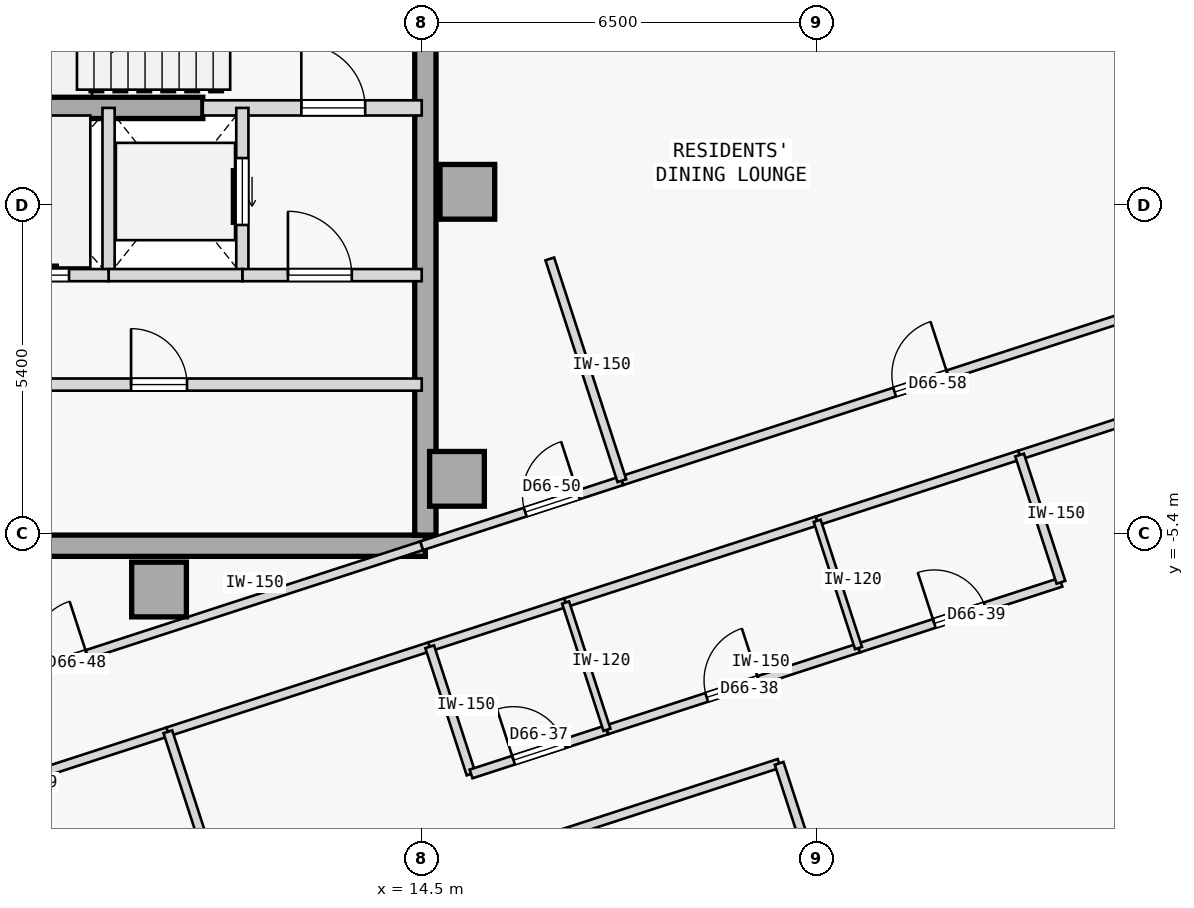
"""IFC4 building model, lengths in metres.
Left out: names, types, materials, properties, quantities, classifications, styles, units other than length and angle.
Written with IfcOpenShell. Run it as: python <this file> out.ifc"""

import sys

from ifc_helpers import new_model, si_unit, direction, frame, frame_2d, origin, origin_2d, place, context, subcontext, project, spatial, rectangle, extrude, element, fill, save


model = new_model("IFC4")
c1 = context("Model", 3, precision=1e-05, world=origin(), true_north=direction((0.0, 1.0)))
c2 = subcontext(c1, "Body", "Model", "MODEL_VIEW")
j1 = project(units=[si_unit("LENGTHUNIT", "METRE"), si_unit("PLANEANGLEUNIT", "RADIAN")], contexts=[c1])
p1 = place(None, origin())
s1 = spatial("IfcSite", under=j1, at=p1, CompositionType="ELEMENT")
p2 = place(p1, origin())
s2 = spatial("IfcBuilding", under=s1, at=p2, CompositionType="ELEMENT")
p3 = place(p2, frame((0.0, 0.0, 247.75)))
s3 = spatial("IfcBuildingStorey", under=s2, at=p3, CompositionType="ELEMENT", Elevation=247.75)
for number, where, z_axis, x_axis in (
    (1, (15.25, 0.22, 0.0), (0.0, 0.0, 1.0), (1.0, 0.0, 0.0)),
    (2, (15.08, -4.5, 0.0), (0.0, 0.0, 1.0), (1.0, 0.0, 0.0)),
    (3, (10.18, -6.32, 0.0), (0.0, 0.0, 1.0), (1.0, 0.0, 0.0)),
):
    element("IfcColumn", number, at=place(p3, frame(where, z_axis=z_axis, x_axis=x_axis)), inside=s3, PredefinedType="COLUMN", context=c2, shape_type="SweptSolid", body=[
        extrude(rectangle(XDim=0.9, YDim=0.9, at=origin_2d()), origin(), (0.0, 0.0, 1.0), 3.35),
    ])
p4 = place(p3, frame((3.7, -5.6, 0.0), z_axis=(0.0, 0.0, 1.0), x_axis=(1.0, 0.0, 0.0)))
e4 = element("IfcWall", 4, at=p4, inside=s3, PredefinedType="SHEAR", context=c2, shape_type="SweptSolid", body=[
    extrude(rectangle(XDim=10.86, YDim=0.35, at=frame_2d((5.43, 0.0))), origin(), (0.0, 0.0, 1.0), 3.125),
])
p5 = place(p3, frame((14.56, -5.425, 0.0), z_axis=(0.0, 0.0, 1.0), x_axis=(0.0, 1.0, 0.0)))
e5 = element("IfcWall", 5, at=p5, inside=s3, PredefinedType="SHEAR", context=c2, shape_type="SweptSolid", body=[
    extrude(rectangle(XDim=10.85, YDim=0.35, at=frame_2d((5.425, 0.0))), origin(), (0.0, 0.0, 1.0), 3.125),
])
p6 = place(p3, frame((5.75, 1.6, 0.0), z_axis=(0.0, 0.0, 1.0), x_axis=(1.0, 0.0, 0.0)))
e6 = element("IfcWall", 6, at=p6, inside=s3, PredefinedType="SHEAR", context=c2, shape_type="SweptSolid", body=[
    extrude(rectangle(XDim=5.15, YDim=0.35, at=frame_2d((2.575, 0.0))), origin(), (0.0, 0.0, 1.0), 3.125),
])
p7 = place(p3, frame((10.9, 1.6, 0.0), z_axis=(0.0, 0.0, 1.0), x_axis=(1.0, 0.0, 0.0)))
e7 = element("IfcWall", 7, at=p7, inside=s3, PredefinedType="STANDARD", context=c2, shape_type="SweptSolid", body=[
    extrude(rectangle(XDim=3.6, YDim=0.25, at=frame_2d((1.8, 0.0))), origin(), (0.0, 0.0, 1.0), 3.125),
])
p8 = place(p7, frame((1.62, 0.0, 0.0)))
e8 = element("IfcOpeningElement", 8, at=p8, cuts=e7, PredefinedType="OPENING", context=c2, shape_type="SweptSolid", body=[
    extrude(rectangle(XDim=1.05, YDim=2.15, at=frame_2d((0.525, 1.075))), frame((0.0, 0.135, 0.0), z_axis=(0.0, -1.0, 0.0), x_axis=(1.0, 0.0, 0.0)), (0.0, 0.0, 1.0), 0.27),
])
p9 = place(p3, frame((11.55, -1.15, 0.0), z_axis=(0.0, 0.0, 1.0), x_axis=(0.0, 1.0, 0.0)))
e9 = element("IfcWall", 9, at=p9, inside=s3, PredefinedType="STANDARD", context=c2, shape_type="SweptSolid", body=[
    extrude(rectangle(XDim=2.75, YDim=0.2, at=frame_2d((1.375, 0.0))), origin(), (0.0, 0.0, 1.0), 3.125),
])
p10 = place(p9, frame((0.825, 0.0, 0.0)))
e10 = element("IfcOpeningElement", 10, at=p10, cuts=e9, PredefinedType="OPENING", context=c2, shape_type="SweptSolid", body=[
    extrude(rectangle(XDim=1.1, YDim=2.15, at=frame_2d((0.55, 1.075))), frame((0.0, 0.11, 0.0), z_axis=(0.0, -1.0, 0.0), x_axis=(1.0, 0.0, 0.0)), (0.0, 0.0, 1.0), 0.22),
])
p11 = place(p3, frame((9.35, -1.15, 0.0), z_axis=(0.0, 0.0, 1.0), x_axis=(0.0, 1.0, 0.0)))
e11 = element("IfcWall", 11, at=p11, inside=s3, PredefinedType="STANDARD", context=c2, shape_type="SweptSolid", body=[
    extrude(rectangle(XDim=2.75, YDim=0.2, at=frame_2d((1.375, 0.0))), origin(), (0.0, 0.0, 1.0), 3.125),
])
p12 = place(p3, frame((11.55, -1.15, 0.0), z_axis=(0.0, 0.0, 1.0), x_axis=(1.0, 0.0, 0.0)))
e12 = element("IfcWall", 12, at=p12, inside=s3, PredefinedType="STANDARD", context=c2, shape_type="SweptSolid", body=[
    extrude(rectangle(XDim=2.95, YDim=0.2, at=frame_2d((1.475, 0.0))), origin(), (0.0, 0.0, 1.0), 3.125),
])
p13 = place(p12, frame((0.75, 0.0, 0.0)))
e13 = element("IfcOpeningElement", 13, at=p13, cuts=e12, PredefinedType="OPENING", context=c2, shape_type="SweptSolid", body=[
    extrude(rectangle(XDim=1.05, YDim=2.18, at=frame_2d((0.525, 1.09))), frame((0.0, 0.11, 0.0), z_axis=(0.0, -1.0, 0.0), x_axis=(1.0, 0.0, 0.0)), (0.0, 0.0, 1.0), 0.22),
])
p14 = place(p3, frame((9.35, -1.15, 0.0), z_axis=(0.0, 0.0, 1.0), x_axis=(1.0, 0.0, 0.0)))
e14 = element("IfcWall", 14, at=p14, inside=s3, PredefinedType="STANDARD", context=c2, shape_type="SweptSolid", body=[
    extrude(rectangle(XDim=2.2, YDim=0.2, at=frame_2d((1.1, 0.0))), origin(), (0.0, 0.0, 1.0), 3.125),
])
p15 = place(p3, frame((6.95, -1.15, 0.0), z_axis=(0.0, 0.0, 1.0), x_axis=(1.0, 0.0, 0.0)))
e15 = element("IfcWall", 15, at=p15, inside=s3, PredefinedType="STANDARD", context=c2, shape_type="SweptSolid", body=[
    extrude(rectangle(XDim=2.4, YDim=0.2, at=frame_2d((1.2, 0.0))), origin(), (0.0, 0.0, 1.0), 3.125),
])
p16 = place(p15, frame((0.65, 0.0, 0.0)))
e16 = element("IfcOpeningElement", 16, at=p16, cuts=e15, PredefinedType="OPENING", context=c2, shape_type="SweptSolid", body=[
    extrude(rectangle(XDim=1.1, YDim=2.15, at=frame_2d((0.55, 1.075))), frame((0.0, 0.11, 0.0), z_axis=(0.0, -1.0, 0.0), x_axis=(1.0, 0.0, 0.0)), (0.0, 0.0, 1.0), 0.22),
])
p17 = place(p3, frame((3.7, -2.95, 0.0), z_axis=(0.0, 0.0, 1.0), x_axis=(1.0, 0.0, 0.0)))
e17 = element("IfcWall", 17, at=p17, inside=s3, PredefinedType="STANDARD", context=c2, shape_type="SweptSolid", body=[
    extrude(rectangle(XDim=10.8, YDim=0.2, at=frame_2d((5.4, 0.0))), origin(), (0.0, 0.0, 1.0), 3.125),
])
p18 = place(p17, frame((0.53, 0.0, 0.0)))
e18 = element("IfcOpeningElement", 18, at=p18, cuts=e17, PredefinedType="OPENING", context=c2, shape_type="SweptSolid", body=[
    extrude(rectangle(XDim=1.1, YDim=2.15, at=frame_2d((0.55, 1.075))), frame((0.0, 0.11, 0.0), z_axis=(0.0, -1.0, 0.0), x_axis=(1.0, 0.0, 0.0)), (0.0, 0.0, 1.0), 0.22),
])
p19 = place(p17, frame((6.02, 0.0, 0.0)))
e19 = element("IfcOpeningElement", 19, at=p19, cuts=e17, PredefinedType="OPENING", context=c2, shape_type="SweptSolid", body=[
    extrude(rectangle(XDim=0.92, YDim=2.15, at=frame_2d((0.46, 1.075))), frame((0.0, 0.11, 0.0), z_axis=(0.0, -1.0, 0.0), x_axis=(1.0, 0.0, 0.0)), (0.0, 0.0, 1.0), 0.22),
])
p20 = place(p3, frame((5.174, -10.334, 0.0), z_axis=(0.0, 0.0, 1.0), x_axis=(0.951058579685, 0.30901064384, 0.0)))
e20 = element("IfcWall", 20, at=p20, inside=s3, PredefinedType="PARTITIONING", context=c2, shape_type="SweptSolid", body=[
    extrude(rectangle(XDim=5.416, YDim=0.15, at=frame_2d((2.708, 0.0))), origin(), (0.0, 0.0, 1.0), 3.125),
])
p21 = place(p20, frame((2.233, 0.0, 0.0)))
e21 = element("IfcOpeningElement", 21, at=p21, cuts=e20, PredefinedType="OPENING", context=c2, shape_type="SweptSolid", body=[
    extrude(rectangle(XDim=0.95, YDim=2.15, at=frame_2d((0.475, 1.075))), frame((0.0, 0.085, 0.0), z_axis=(0.0, -1.0, 0.0), x_axis=(1.0, 0.0, 0.0)), (0.0, 0.0, 1.0), 0.17),
])
p22 = place(p3, frame((10.325, -8.66, 0.0), z_axis=(0.0, 0.0, 1.0), x_axis=(0.95106061278, 0.309004386407, 0.0)))
e22 = element("IfcWall", 22, at=p22, inside=s3, PredefinedType="PARTITIONING", context=c2, shape_type="SweptSolid", body=[
    extrude(rectangle(XDim=4.528, YDim=0.15, at=frame_2d((2.264, 0.0))), origin(), (0.0, 0.0, 1.0), 3.125),
])
p23 = place(p3, frame((24.332, -4.109, 0.0), z_axis=(0.0, 0.0, 1.0), x_axis=(0.951058083458, 0.309012171103, 0.0)))
e23 = element("IfcWall", 23, at=p23, inside=s3, PredefinedType="PARTITIONING", context=c2, shape_type="SweptSolid", body=[
    extrude(rectangle(XDim=5.976, YDim=0.15, at=frame_2d((2.988, 0.0))), origin(), (0.0, 0.0, 1.0), 3.125),
])
p24 = place(p23, frame((2.513, 0.0, 0.0)))
e24 = element("IfcOpeningElement", 24, at=p24, cuts=e23, PredefinedType="OPENING", context=c2, shape_type="SweptSolid", body=[
    extrude(rectangle(XDim=0.95, YDim=2.15, at=frame_2d((0.475, 1.075))), frame((0.0, 0.085, 0.0), z_axis=(0.0, -1.0, 0.0), x_axis=(1.0, 0.0, 0.0)), (0.0, 0.0, 1.0), 0.17),
])
p25 = place(p3, frame((14.631, -7.261, 0.0), z_axis=(0.0, 0.0, 1.0), x_axis=(0.951066131077, 0.308987401554, 0.0)))
e25 = element("IfcWall", 25, at=p25, inside=s3, PredefinedType="PARTITIONING", context=c2, shape_type="SweptSolid", body=[
    extrude(rectangle(XDim=2.35, YDim=0.15, at=frame_2d((1.175, 0.0))), origin(), (0.0, 0.0, 1.0), 3.125),
])
p26 = place(p3, frame((16.866, -6.535, 0.0), z_axis=(0.0, 0.0, 1.0), x_axis=(0.951041492154, 0.309063230101, 0.0)))
e26 = element("IfcWall", 26, at=p26, inside=s3, PredefinedType="PARTITIONING", context=c2, shape_type="SweptSolid", body=[
    extrude(rectangle(XDim=4.35, YDim=0.15, at=frame_2d((2.175, 0.0))), origin(), (0.0, 0.0, 1.0), 3.125),
])
p27 = place(p3, frame((21.003, -5.19, 0.0), z_axis=(0.0, 0.0, 1.0), x_axis=(0.951055596592, 0.309019824916, 0.0)))
e27 = element("IfcWall", 27, at=p27, inside=s3, PredefinedType="PARTITIONING", context=c2, shape_type="SweptSolid", body=[
    extrude(rectangle(XDim=3.5, YDim=0.15, at=frame_2d((1.75, 0.0))), origin(), (0.0, 0.0, 1.0), 3.125),
])
p28 = place(p3, frame((7.588, -7.846, 0.0), z_axis=(0.0, 0.0, 1.0), x_axis=(0.951058013903, 0.309012385174, 0.0)))
e28 = element("IfcWall", 28, at=p28, inside=s3, PredefinedType="PARTITIONING", context=c2, shape_type="SweptSolid", body=[
    extrude(rectangle(XDim=7.267, YDim=0.15, at=frame_2d((3.634, 0.0))), origin(), (0.0, 0.0, 1.0), 3.125),
])
p29 = place(p28, frame((0.557, 0.0, 0.0)))
e29 = element("IfcOpeningElement", 29, at=p29, cuts=e28, PredefinedType="OPENING", context=c2, shape_type="SweptSolid", body=[
    extrude(rectangle(XDim=0.92, YDim=2.15, at=frame_2d((0.46, 1.075))), frame((0.0, 0.085, 0.0), z_axis=(0.0, -1.0, 0.0), x_axis=(1.0, 0.0, 0.0)), (0.0, 0.0, 1.0), 0.17),
])
p30 = place(p3, frame((14.5, -5.6, 0.0), z_axis=(0.0, 0.0, 1.0), x_axis=(0.951047546178, 0.309044600193, 0.0)))
e30 = element("IfcWall", 30, at=p30, inside=s3, PredefinedType="PARTITIONING", context=c2, shape_type="SweptSolid", body=[
    extrude(rectangle(XDim=3.461, YDim=0.15, at=frame_2d((1.73, 0.0))), origin(), (0.0, 0.0, 1.0), 3.125),
])
p31 = place(p30, frame((1.79, 0.0, 0.0)))
e31 = element("IfcOpeningElement", 31, at=p31, cuts=e30, PredefinedType="OPENING", context=c2, shape_type="SweptSolid", body=[
    extrude(rectangle(XDim=0.92, YDim=2.15, at=frame_2d((0.46, 1.075))), frame((0.0, 0.085, 0.0), z_axis=(0.0, -1.0, 0.0), x_axis=(1.0, 0.0, 0.0)), (0.0, 0.0, 1.0), 0.17),
])
p32 = place(p3, frame((17.791, -4.531, 0.0), z_axis=(0.0, 0.0, 1.0), x_axis=(0.951056769902, 0.309016213852, 0.0)))
e32 = element("IfcWall", 32, at=p32, inside=s3, PredefinedType="PARTITIONING", context=c2, shape_type="SweptSolid", body=[
    extrude(rectangle(XDim=10.352, YDim=0.15, at=frame_2d((5.176, 0.0))), origin(), (0.0, 0.0, 1.0), 3.125),
])
p33 = place(p32, frame((4.716, 0.0, 0.0)))
e33 = element("IfcOpeningElement", 33, at=p33, cuts=e32, PredefinedType="OPENING", context=c2, shape_type="SweptSolid", body=[
    extrude(rectangle(XDim=0.92, YDim=2.15, at=frame_2d((0.46, 1.075))), frame((0.0, 0.085, 0.0), z_axis=(0.0, -1.0, 0.0), x_axis=(1.0, 0.0, 0.0)), (0.0, 0.0, 1.0), 0.17),
])
p34 = place(p3, frame((27.637, -1.332, 0.0), z_axis=(0.0, 0.0, 1.0), x_axis=(-0.309040411618, 0.951048907253, 0.0)))
e34 = element("IfcWall", 34, at=p34, inside=s3, PredefinedType="PARTITIONING", context=c2, shape_type="SweptSolid", body=[
    extrude(rectangle(XDim=8.826, YDim=0.15, at=frame_2d((4.413, 0.0))), origin(), (0.0, 0.0, 1.0), 3.125),
])
p35 = place(p3, frame((13.372, -18.04, 0.0), z_axis=(0.0, 0.0, 1.0), x_axis=(-0.308999867152, 0.951062081097, 0.0)))
e35 = element("IfcWall", 35, at=p35, inside=s3, PredefinedType="PARTITIONING", context=c2, shape_type="SweptSolid", body=[
    extrude(rectangle(XDim=9.862, YDim=0.15, at=frame_2d((4.931, 0.0))), origin(), (0.0, 0.0, 1.0), 3.125),
])
p36 = place(p3, frame((15.311, -9.353, 0.0), z_axis=(0.0, 0.0, 1.0), x_axis=(-0.308960600764, 0.951074837842, 0.0)))
e36 = element("IfcWall", 36, at=p36, inside=s3, PredefinedType="PARTITIONING", context=c2, shape_type="SweptSolid", body=[
    extrude(rectangle(XDim=2.2, YDim=0.15, at=frame_2d((1.1, 0.0))), origin(), (0.0, 0.0, 1.0), 3.125),
])
p37 = place(p3, frame((15.311, -9.353, 0.0), z_axis=(0.0, 0.0, 1.0), x_axis=(0.951076048914, 0.308956872689, 0.0)))
e37 = element("IfcWall", 37, at=p37, inside=s3, PredefinedType="PARTITIONING", context=c2, shape_type="SweptSolid", body=[
    extrude(rectangle(XDim=2.35, YDim=0.15, at=frame_2d((1.175, 0.0))), origin(), (0.0, 0.0, 1.0), 3.125),
])
p38 = place(p37, frame((0.735, 0.0, 0.0)))
e38 = element("IfcOpeningElement", 38, at=p38, cuts=e37, PredefinedType="OPENING", context=c2, shape_type="SweptSolid", body=[
    extrude(rectangle(XDim=0.88, YDim=2.15, at=frame_2d((0.44, 1.075))), frame((0.0, 0.085, 0.0), z_axis=(0.0, -1.0, 0.0), x_axis=(1.0, 0.0, 0.0)), (0.0, 0.0, 1.0), 0.17),
])
p39 = place(p3, frame((17.546, -8.627, 0.0), z_axis=(0.0, 0.0, 1.0), x_axis=(0.951052627573, 0.309028962374, 0.0)))
e39 = element("IfcWall", 39, at=p39, inside=s3, PredefinedType="PARTITIONING", context=c2, shape_type="SweptSolid", body=[
    extrude(rectangle(XDim=4.35, YDim=0.15, at=frame_2d((2.175, 0.0))), origin(), (0.0, 0.0, 1.0), 3.125),
])
p40 = place(p39, frame((1.725, 0.0, 0.0)))
e40 = element("IfcOpeningElement", 40, at=p40, cuts=e39, PredefinedType="OPENING", context=c2, shape_type="SweptSolid", body=[
    extrude(rectangle(XDim=0.9, YDim=2.15, at=frame_2d((0.45, 1.075))), frame((0.0, 0.085, 0.0), z_axis=(0.0, -1.0, 0.0), x_axis=(1.0, 0.0, 0.0)), (0.0, 0.0, 1.0), 0.17),
])
p41 = place(p3, frame((21.683, -7.283, 0.0), z_axis=(0.0, 0.0, 1.0), x_axis=(0.951062257173, 0.308999325213, 0.0)))
e41 = element("IfcWall", 41, at=p41, inside=s3, PredefinedType="PARTITIONING", context=c2, shape_type="SweptSolid", body=[
    extrude(rectangle(XDim=3.5, YDim=0.15, at=frame_2d((1.75, 0.0))), origin(), (0.0, 0.0, 1.0), 3.125),
])
p42 = place(p41, frame((1.31, 0.0, 0.0)))
e42 = element("IfcOpeningElement", 42, at=p42, cuts=e41, PredefinedType="OPENING", context=c2, shape_type="SweptSolid", body=[
    extrude(rectangle(XDim=0.88, YDim=2.15, at=frame_2d((0.44, 1.075))), frame((0.0, 0.085, 0.0), z_axis=(0.0, -1.0, 0.0), x_axis=(1.0, 0.0, 0.0)), (0.0, 0.0, 1.0), 0.17),
])
p43 = place(p3, frame((25.012, -6.201, 0.0), z_axis=(0.0, 0.0, 1.0), x_axis=(-0.309028364152, 0.951052821956, 0.0)))
e43 = element("IfcWall", 43, at=p43, inside=s3, PredefinedType="PARTITIONING", context=c2, shape_type="SweptSolid", body=[
    extrude(rectangle(XDim=2.2, YDim=0.15, at=frame_2d((1.1, 0.0))), origin(), (0.0, 0.0, 1.0), 3.125),
])
p44 = place(p3, frame((15.955, -10.616, 0.0), z_axis=(0.0, 0.0, 1.0), x_axis=(0.951050272606, 0.309036209813, 0.0)))
e44 = element("IfcWall", 44, at=p44, inside=s3, PredefinedType="PARTITIONING", context=c2, shape_type="SweptSolid", body=[
    extrude(rectangle(XDim=4.65, YDim=0.15, at=frame_2d((2.325, 0.0))), origin(), (0.0, 0.0, 1.0), 3.125),
])
p45 = place(p3, frame((22.312, -15.135, 0.0), z_axis=(0.0, 0.0, 1.0), x_axis=(-0.309013782848, 0.951057559777, 0.0)))
e45 = element("IfcWall", 45, at=p45, inside=s3, PredefinedType="PARTITIONING", context=c2, shape_type="SweptSolid", body=[
    extrude(rectangle(XDim=6.262, YDim=0.15, at=frame_2d((3.131, 0.0))), origin(), (0.0, 0.0, 1.0), 3.125),
])
p46 = place(p45, frame((2.681, 0.0, 0.0)))
e46 = element("IfcOpeningElement", 46, at=p46, cuts=e45, PredefinedType="OPENING", context=c2, shape_type="SweptSolid", body=[
    extrude(rectangle(XDim=0.9, YDim=2.15, at=frame_2d((0.45, 1.075))), frame((0.0, 0.085, 0.0), z_axis=(0.0, -1.0, 0.0), x_axis=(1.0, 0.0, 0.0)), (0.0, 0.0, 1.0), 0.17),
])
p47 = place(p3, frame((17.546, -8.627, 0.0), z_axis=(0.0, 0.0, 1.0), x_axis=(-0.309060979314, 0.951042223598, 0.0)))
e47 = element("IfcWall", 47, at=p47, inside=s3, PredefinedType="PARTITIONING", context=c2, shape_type="SweptSolid", body=[
    extrude(rectangle(XDim=2.2, YDim=0.12, at=frame_2d((1.1, 0.0))), origin(), (0.0, 0.0, 1.0), 3.125),
])
p48 = place(p3, frame((21.683, -7.283, 0.0), z_axis=(0.0, 0.0, 1.0), x_axis=(-0.30892799396, 0.951085429679, 0.0)))
e48 = element("IfcWall", 48, at=p48, inside=s3, PredefinedType="PARTITIONING", context=c2, shape_type="SweptSolid", body=[
    extrude(rectangle(XDim=2.2, YDim=0.12, at=frame_2d((1.1, 0.0))), origin(), (0.0, 0.0, 1.0), 3.125),
])
p49 = place(p3, frame((17.791, -4.531, 0.0), z_axis=(0.0, 0.0, 1.0), x_axis=(-0.309018414265, 0.951056054944, 0.0)))
e49 = element("IfcWall", 49, at=p49, inside=s3, PredefinedType="PARTITIONING", context=c2, shape_type="SweptSolid", body=[
    extrude(rectangle(XDim=3.835, YDim=0.15, at=frame_2d((1.917, 0.0))), origin(), (0.0, 0.0, 1.0), 3.125),
])
p50 = place(p8, origin())
e50 = element("IfcDoor", 50, at=p50, inside=s3, OperationType="SINGLE_SWING_LEFT", PredefinedType="DOOR", context=c2, shape_type="SweptSolid", body=[
    extrude(rectangle(XDim=1.05, YDim=2.15, at=frame_2d((0.525, 1.075))), frame((0.0, 0.025, 0.0), z_axis=(0.0, -1.0, 0.0), x_axis=(1.0, 0.0, 0.0)), (0.0, 0.0, 1.0), 0.05),
])
fill(e8, e50)
p51 = place(p13, origin())
e51 = element("IfcDoor", 51, at=p51, inside=s3, OperationType="SINGLE_SWING_LEFT", PredefinedType="DOOR", context=c2, shape_type="SweptSolid", body=[
    extrude(rectangle(XDim=1.05, YDim=2.18, at=frame_2d((0.525, 1.09))), frame((0.0, 0.025, 0.0), z_axis=(0.0, -1.0, 0.0), x_axis=(1.0, 0.0, 0.0)), (0.0, 0.0, 1.0), 0.05),
])
fill(e13, e51)
p52 = place(p10, origin())
e52 = element("IfcDoor", 52, at=p52, inside=s3, OperationType="SLIDING_TO_RIGHT", PredefinedType="DOOR", context=c2, shape_type="SweptSolid", body=[
    extrude(rectangle(XDim=1.1, YDim=2.15, at=frame_2d((0.55, 1.075))), frame((0.0, 0.025, 0.0), z_axis=(0.0, -1.0, 0.0), x_axis=(1.0, 0.0, 0.0)), (0.0, 0.0, 1.0), 0.05),
])
fill(e10, e52)
p53 = place(p16, origin())
e53 = element("IfcDoor", 53, at=p53, inside=s3, OperationType="SLIDING_TO_RIGHT", PredefinedType="DOOR", context=c2, shape_type="SweptSolid", body=[
    extrude(rectangle(XDim=1.1, YDim=2.15, at=frame_2d((0.55, 1.075))), frame((0.0, 0.025, 0.0), z_axis=(0.0, -1.0, 0.0), x_axis=(1.0, 0.0, 0.0)), (0.0, 0.0, 1.0), 0.05),
])
fill(e16, e53)
p54 = place(p19, origin())
e54 = element("IfcDoor", 54, at=p54, inside=s3, OperationType="SINGLE_SWING_LEFT", PredefinedType="DOOR", context=c2, shape_type="SweptSolid", body=[
    extrude(rectangle(XDim=0.92, YDim=2.15, at=frame_2d((0.46, 1.075))), frame((0.0, 0.025, 0.0), z_axis=(0.0, -1.0, 0.0), x_axis=(1.0, 0.0, 0.0)), (0.0, 0.0, 1.0), 0.05),
])
fill(e19, e54)
p55 = place(p38, origin())
e55 = element("IfcDoor", 55, at=p55, inside=s3, OperationType="SINGLE_SWING_LEFT", PredefinedType="DOOR", context=c2, shape_type="SweptSolid", body=[
    extrude(rectangle(XDim=0.88, YDim=2.15, at=frame_2d((0.44, 1.075))), frame((0.0, 0.025, 0.0), z_axis=(0.0, -1.0, 0.0), x_axis=(1.0, 0.0, 0.0)), (0.0, 0.0, 1.0), 0.05),
])
fill(e38, e55)
p56 = place(p40, origin())
e56 = element("IfcDoor", 56, at=p56, inside=s3, OperationType="SINGLE_SWING_RIGHT", PredefinedType="DOOR", context=c2, shape_type="SweptSolid", body=[
    extrude(rectangle(XDim=0.9, YDim=2.15, at=frame_2d((0.45, 1.075))), frame((0.0, 0.025, 0.0), z_axis=(0.0, -1.0, 0.0), x_axis=(1.0, 0.0, 0.0)), (0.0, 0.0, 1.0), 0.05),
])
fill(e40, e56)
p57 = place(p42, origin())
e57 = element("IfcDoor", 57, at=p57, inside=s3, OperationType="SINGLE_SWING_LEFT", PredefinedType="DOOR", context=c2, shape_type="SweptSolid", body=[
    extrude(rectangle(XDim=0.88, YDim=2.15, at=frame_2d((0.44, 1.075))), frame((0.0, 0.025, 0.0), z_axis=(0.0, -1.0, 0.0), x_axis=(1.0, 0.0, 0.0)), (0.0, 0.0, 1.0), 0.05),
])
fill(e42, e57)
p58 = place(p29, origin())
e58 = element("IfcDoor", 58, at=p58, inside=s3, OperationType="SINGLE_SWING_RIGHT", PredefinedType="DOOR", context=c2, shape_type="SweptSolid", body=[
    extrude(rectangle(XDim=0.92, YDim=2.15, at=frame_2d((0.46, 1.075))), frame((0.0, 0.025, 0.0), z_axis=(0.0, -1.0, 0.0), x_axis=(1.0, 0.0, 0.0)), (0.0, 0.0, 1.0), 0.05),
])
fill(e29, e58)
p59 = place(p31, origin())
e59 = element("IfcDoor", 59, at=p59, inside=s3, OperationType="SINGLE_SWING_RIGHT", PredefinedType="DOOR", context=c2, shape_type="SweptSolid", body=[
    extrude(rectangle(XDim=0.92, YDim=2.15, at=frame_2d((0.46, 1.075))), frame((0.0, 0.025, 0.0), z_axis=(0.0, -1.0, 0.0), x_axis=(1.0, 0.0, 0.0)), (0.0, 0.0, 1.0), 0.05),
])
fill(e31, e59)
p60 = place(p33, origin())
e60 = element("IfcDoor", 60, at=p60, inside=s3, OperationType="SINGLE_SWING_RIGHT", PredefinedType="DOOR", context=c2, shape_type="SweptSolid", body=[
    extrude(rectangle(XDim=0.92, YDim=2.15, at=frame_2d((0.46, 1.075))), frame((0.0, 0.025, 0.0), z_axis=(0.0, -1.0, 0.0), x_axis=(1.0, 0.0, 0.0)), (0.0, 0.0, 1.0), 0.05),
])
fill(e33, e60)
save(model, sys.argv[1])
